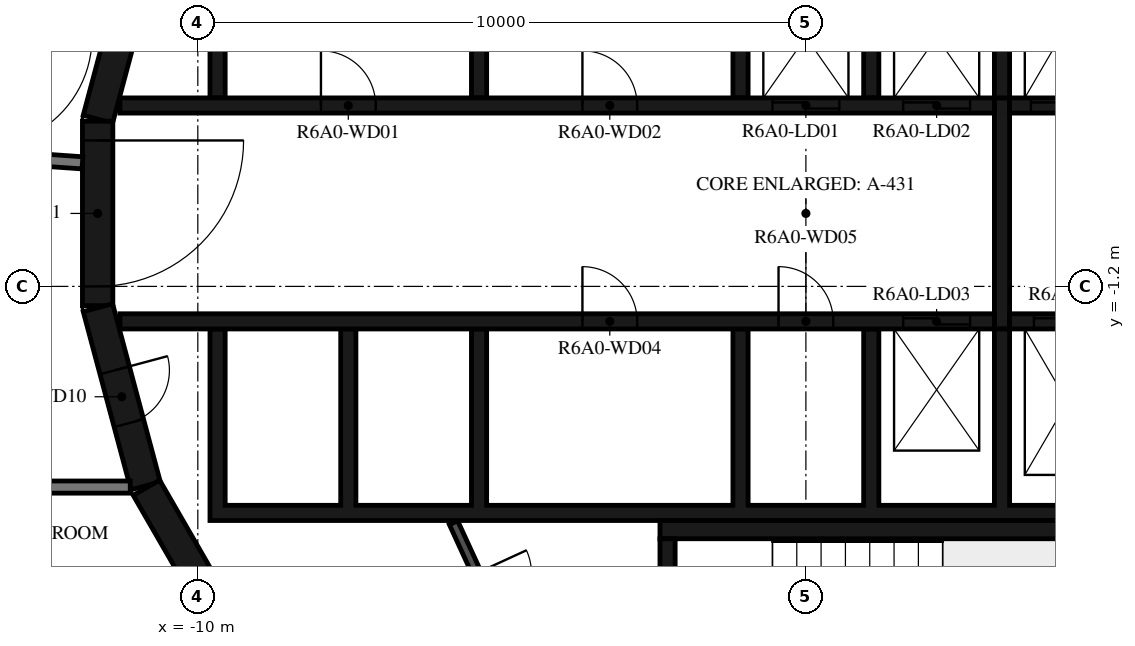
"""IFC4 building model, lengths in metres.
Left out: names, types, materials, properties, quantities, classifications, styles, units other than length and angle.
Written with IfcOpenShell. Run it as: python <this file> out.ifc"""

import sys

from ifc_helpers import new_model, si_unit, direction, frame, frame_2d, origin, place, context, subcontext, project, spatial, polyline, rectangle, outline, extrude, element, fill, save


model = new_model("IFC4")
c1 = context("Model", 3, precision=1e-05, world=origin(), true_north=direction((0.0, 1.0)))
c2 = subcontext(c1, "Body", "Model", "MODEL_VIEW")
j1 = project(units=[si_unit("LENGTHUNIT", "METRE"), si_unit("PLANEANGLEUNIT", "RADIAN")], contexts=[c1])
p1 = place(None, origin())
s1 = spatial("IfcSite", under=j1, at=p1, CompositionType="ELEMENT")
p2 = place(p1, origin())
s2 = spatial("IfcBuilding", under=s1, at=p2, CompositionType="ELEMENT")
p3 = place(p2, frame((0.0, 0.0, 233.7)))
s3 = spatial("IfcBuildingStorey", under=s2, at=p3, CompositionType="ELEMENT", Elevation=233.7)
p4 = place(p3, frame((-10.858, 4.479, 0.0), z_axis=(0.0, 0.0, 1.0), x_axis=(-0.258734743916, -0.965948410781, 0.0)))
e1 = element("IfcWall", 1, at=p4, inside=s3, PredefinedType="SHEAR", context=c2, shape_type="SweptSolid", body=[
    extrude(rectangle(XDim=3.033, YDim=0.5, at=frame_2d((1.516, 0.0))), origin(), (0.0, 0.0, 1.0), 3.12),
])
p5 = place(p3, frame((-11.647, 1.516, 0.0), z_axis=(0.0, 0.0, 1.0), x_axis=(0.0, -1.0, 0.0)))
e2 = element("IfcWall", 2, at=p5, inside=s3, PredefinedType="SHEAR", context=c2, shape_type="SweptSolid", body=[
    extrude(rectangle(XDim=3.033, YDim=0.5, at=frame_2d((1.516, 0.0))), origin(), (0.0, 0.0, 1.0), 3.12),
])
p6 = place(p5, frame((0.316, 0.0, 0.0)))
e3 = element("IfcOpeningElement", 3, at=p6, cuts=e2, PredefinedType="OPENING", context=c2, shape_type="SweptSolid", body=[
    extrude(rectangle(XDim=2.4, YDim=2.1, at=frame_2d((1.2, 1.05))), frame((0.0, 0.26, 0.0), z_axis=(0.0, -1.0, 0.0), x_axis=(1.0, 0.0, 0.0)), (0.0, 0.0, 1.0), 0.52),
])
p7 = place(p3, frame((-11.643, -1.55, 0.0), z_axis=(0.0, 0.0, 1.0), x_axis=(0.258734743916, -0.965948410781, 0.0)))
e4 = element("IfcWall", 4, at=p7, inside=s3, PredefinedType="SHEAR", context=c2, shape_type="SweptSolid", body=[
    extrude(rectangle(XDim=3.033, YDim=0.5, at=frame_2d((1.516, 0.0))), origin(), (0.0, 0.0, 1.0), 3.12),
])
p8 = place(p7, frame((1.066, 0.0, 0.0)))
e5 = element("IfcOpeningElement", 5, at=p8, cuts=e4, PredefinedType="OPENING", context=c2, shape_type="SweptSolid", body=[
    extrude(rectangle(XDim=0.9, YDim=2.1, at=frame_2d((0.45, 1.05))), frame((0.0, 0.26, 0.0), z_axis=(0.0, -1.0, 0.0), x_axis=(1.0, 0.0, 0.0)), (0.0, 0.0, 1.0), 0.52),
])
p9 = place(p3, frame((-10.845, -4.51, 0.0), z_axis=(0.0, 0.0, 1.0), x_axis=(0.500087131594, -0.865975092491, 0.0)))
e6 = element("IfcWall", 6, at=p9, inside=s3, PredefinedType="SHEAR", context=c2, shape_type="SweptSolid", body=[
    extrude(rectangle(XDim=3.033, YDim=0.5, at=frame_2d((1.516, 0.0))), origin(), (0.0, 0.0, 1.0), 3.12),
])
p10 = place(p3, frame((-2.275, -8.67, 0.0), z_axis=(0.0, 0.0, 1.0), x_axis=(0.0, 1.0, 0.0)))
e7 = element("IfcWall", 7, at=p10, inside=s3, PredefinedType="SHEAR", context=c2, shape_type="SweptSolid", body=[
    extrude(rectangle(XDim=3.32, YDim=0.25, at=frame_2d((1.66, 0.0))), origin(), (0.0, 0.0, 1.0), 3.12),
])
p11 = place(p3, frame((-2.4, -5.2, 0.0), z_axis=(0.0, 0.0, 1.0), x_axis=(1.0, 0.0, 0.0)))
e8 = element("IfcWall", 8, at=p11, inside=s3, PredefinedType="SHEAR", context=c2, shape_type="SweptSolid", body=[
    extrude(rectangle(XDim=7.05, YDim=0.3, at=frame_2d((3.525, 0.0))), origin(), (0.0, 0.0, 1.0), 3.12),
])
p12 = place(p3, origin())
e9 = element("IfcWall", 9, at=p12, inside=s3, PredefinedType="SHEAR", context=c2, shape_type="SweptSolid", body=[
    extrude(outline(polyline([(-9.55, 4.8), (-5.5, 4.8), (-5.5, 1.9), (-5.25, 1.9), (-5.25, 4.8), (-1.2, 4.8), (-1.2, 1.9), (-0.95, 1.9), (-0.95, 4.8), (0.95, 4.8), (0.95, 1.9), (1.2, 1.9), (1.2, 4.8), (3.1, 4.8), (3.1, 1.9), (3.35, 1.9), (3.35, 4.8), (5.25, 4.8), (5.25, 1.9), (5.5, 1.9), (5.5, 4.8), (7.4, 4.8), (7.4, 1.9), (7.65, 1.9), (7.65, 4.8), (9.55, 4.8), (9.55, 1.9), (9.8, 1.9), (9.8, 4.8), (9.8, 5.05), (-9.8, 5.05), (-9.8, 4.8), (-9.8, 1.9), (-9.55, 1.9), (-9.55, 4.8)])), origin(), (0.0, 0.0, 1.0), 3.12),
])
p13 = place(p3, origin())
e10 = element("IfcWall", 10, at=p13, inside=s3, PredefinedType="SHEAR", context=c2, shape_type="SweptSolid", body=[
    extrude(outline(polyline([(9.8, -5.05), (9.8, -4.8), (9.8, -1.9), (9.55, -1.9), (9.55, -4.8), (7.65, -4.8), (7.65, -1.9), (7.4, -1.9), (7.4, -4.8), (5.5, -4.8), (5.5, -1.9), (5.25, -1.9), (5.25, -4.8), (3.35, -4.8), (3.35, -1.9), (3.1, -1.9), (3.1, -4.8), (1.2, -4.8), (1.2, -1.9), (0.95, -1.9), (0.95, -4.8), (-0.95, -4.8), (-0.95, -1.9), (-1.2, -1.9), (-1.2, -4.8), (-5.25, -4.8), (-5.25, -1.9), (-5.5, -1.9), (-5.5, -4.8), (-7.4, -4.8), (-7.4, -1.9), (-7.65, -1.9), (-7.65, -4.8), (-9.55, -4.8), (-9.55, -1.9), (-9.8, -1.9), (-9.8, -4.8), (-9.8, -5.05), (9.8, -5.05)])), origin(), (0.0, 0.0, 1.0), 3.12),
])
p14 = place(p3, frame((-11.28, 1.775, 0.0), z_axis=(0.0, 0.0, 1.0), x_axis=(1.0, 0.0, 0.0)))
e11 = element("IfcWall", 11, at=p14, inside=s3, PredefinedType="SHEAR", context=c2, shape_type="SweptSolid", body=[
    extrude(rectangle(XDim=14.38, YDim=0.25, at=frame_2d((7.19, 0.0))), origin(), (0.0, 0.0, 1.0), 3.12),
])
p15 = place(p14, frame((10.73, 0.0, 0.0)))
e12 = element("IfcOpeningElement", 12, at=p15, cuts=e11, PredefinedType="OPENING", context=c2, shape_type="SweptSolid", body=[
    extrude(rectangle(XDim=1.1, YDim=2.1, at=frame_2d((0.55, 1.05))), frame((0.0, 0.135, 0.0), z_axis=(0.0, -1.0, 0.0), x_axis=(1.0, 0.0, 0.0)), (0.0, 0.0, 1.0), 0.27),
])
p16 = place(p14, frame((12.88, 0.0, 0.0)))
e13 = element("IfcOpeningElement", 13, at=p16, cuts=e11, PredefinedType="OPENING", context=c2, shape_type="SweptSolid", body=[
    extrude(rectangle(XDim=1.1, YDim=2.1, at=frame_2d((0.55, 1.05))), frame((0.0, 0.135, 0.0), z_axis=(0.0, -1.0, 0.0), x_axis=(1.0, 0.0, 0.0)), (0.0, 0.0, 1.0), 0.27),
])
p17 = place(p14, frame((3.305, 0.0, 0.0)))
e14 = element("IfcOpeningElement", 14, at=p17, cuts=e11, PredefinedType="OPENING", context=c2, shape_type="SweptSolid", body=[
    extrude(rectangle(XDim=0.9, YDim=2.1, at=frame_2d((0.45, 1.05))), frame((0.0, 0.135, 0.0), z_axis=(0.0, -1.0, 0.0), x_axis=(1.0, 0.0, 0.0)), (0.0, 0.0, 1.0), 0.27),
])
p18 = place(p14, frame((7.605, 0.0, 0.0)))
e15 = element("IfcOpeningElement", 15, at=p18, cuts=e11, PredefinedType="OPENING", context=c2, shape_type="SweptSolid", body=[
    extrude(rectangle(XDim=0.9, YDim=2.1, at=frame_2d((0.45, 1.05))), frame((0.0, 0.135, 0.0), z_axis=(0.0, -1.0, 0.0), x_axis=(1.0, 0.0, 0.0)), (0.0, 0.0, 1.0), 0.27),
])
p19 = place(p3, frame((3.35, 1.775, 0.0), z_axis=(0.0, 0.0, 1.0), x_axis=(1.0, 0.0, 0.0)))
e16 = element("IfcWall", 16, at=p19, inside=s3, PredefinedType="SHEAR", context=c2, shape_type="SweptSolid", body=[
    extrude(rectangle(XDim=7.93, YDim=0.25, at=frame_2d((3.965, 0.0))), origin(), (0.0, 0.0, 1.0), 3.12),
])
p20 = place(p19, frame((0.35, 0.0, 0.0)))
e17 = element("IfcOpeningElement", 17, at=p20, cuts=e16, PredefinedType="OPENING", context=c2, shape_type="SweptSolid", body=[
    extrude(rectangle(XDim=1.2, YDim=2.4, at=frame_2d((0.6, 1.2))), frame((0.0, 0.135, 0.0), z_axis=(0.0, -1.0, 0.0), x_axis=(1.0, 0.0, 0.0)), (0.0, 0.0, 1.0), 0.27),
])
p21 = place(p19, frame((2.5, 0.0, 0.0)))
e18 = element("IfcOpeningElement", 18, at=p21, cuts=e16, PredefinedType="OPENING", context=c2, shape_type="SweptSolid", body=[
    extrude(rectangle(XDim=1.2, YDim=2.4, at=frame_2d((0.6, 1.2))), frame((0.0, 0.135, 0.0), z_axis=(0.0, -1.0, 0.0), x_axis=(1.0, 0.0, 0.0)), (0.0, 0.0, 1.0), 0.27),
])
p22 = place(p19, frame((4.8, 0.0, 0.0)))
e19 = element("IfcOpeningElement", 19, at=p22, cuts=e16, PredefinedType="OPENING", context=c2, shape_type="SweptSolid", body=[
    extrude(rectangle(XDim=0.9, YDim=2.1, at=frame_2d((0.45, 1.05))), frame((0.0, 0.135, 0.0), z_axis=(0.0, -1.0, 0.0), x_axis=(1.0, 0.0, 0.0)), (0.0, 0.0, 1.0), 0.27),
])
p23 = place(p3, frame((-11.28, -1.775, 0.0), z_axis=(0.0, 0.0, 1.0), x_axis=(1.0, 0.0, 0.0)))
e20 = element("IfcWall", 20, at=p23, inside=s3, PredefinedType="SHEAR", context=c2, shape_type="SweptSolid", body=[
    extrude(rectangle(XDim=14.38, YDim=0.25, at=frame_2d((7.19, 0.0))), origin(), (0.0, 0.0, 1.0), 3.12),
])
p24 = place(p23, frame((12.88, 0.0, 0.0)))
e21 = element("IfcOpeningElement", 21, at=p24, cuts=e20, PredefinedType="OPENING", context=c2, shape_type="SweptSolid", body=[
    extrude(rectangle(XDim=1.1, YDim=2.1, at=frame_2d((0.55, 1.05))), frame((0.0, 0.135, 0.0), z_axis=(0.0, -1.0, 0.0), x_axis=(1.0, 0.0, 0.0)), (0.0, 0.0, 1.0), 0.27),
])
p25 = place(p23, frame((7.605, 0.0, 0.0)))
e22 = element("IfcOpeningElement", 22, at=p25, cuts=e20, PredefinedType="OPENING", context=c2, shape_type="SweptSolid", body=[
    extrude(rectangle(XDim=0.9, YDim=2.1, at=frame_2d((0.45, 1.05))), frame((0.0, 0.135, 0.0), z_axis=(0.0, -1.0, 0.0), x_axis=(1.0, 0.0, 0.0)), (0.0, 0.0, 1.0), 0.27),
])
p26 = place(p23, frame((10.83, 0.0, 0.0)))
e23 = element("IfcOpeningElement", 23, at=p26, cuts=e20, PredefinedType="OPENING", context=c2, shape_type="SweptSolid", body=[
    extrude(rectangle(XDim=0.9, YDim=2.1, at=frame_2d((0.45, 1.05))), frame((0.0, 0.135, 0.0), z_axis=(0.0, -1.0, 0.0), x_axis=(1.0, 0.0, 0.0)), (0.0, 0.0, 1.0), 0.27),
])
p27 = place(p3, frame((3.35, -1.775, 0.0), z_axis=(0.0, 0.0, 1.0), x_axis=(1.0, 0.0, 0.0)))
e24 = element("IfcWall", 24, at=p27, inside=s3, PredefinedType="SHEAR", context=c2, shape_type="SweptSolid", body=[
    extrude(rectangle(XDim=7.93, YDim=0.25, at=frame_2d((3.965, 0.0))), origin(), (0.0, 0.0, 1.0), 3.12),
])
p28 = place(p27, frame((0.4, 0.0, 0.0)))
e25 = element("IfcOpeningElement", 25, at=p28, cuts=e24, PredefinedType="OPENING", context=c2, shape_type="SweptSolid", body=[
    extrude(rectangle(XDim=1.1, YDim=2.4, at=frame_2d((0.55, 1.2))), frame((0.0, 0.135, 0.0), z_axis=(0.0, -1.0, 0.0), x_axis=(1.0, 0.0, 0.0)), (0.0, 0.0, 1.0), 0.27),
])
p29 = place(p27, frame((2.55, 0.0, 0.0)))
e26 = element("IfcOpeningElement", 26, at=p29, cuts=e24, PredefinedType="OPENING", context=c2, shape_type="SweptSolid", body=[
    extrude(rectangle(XDim=1.1, YDim=2.4, at=frame_2d((0.55, 1.2))), frame((0.0, 0.135, 0.0), z_axis=(0.0, -1.0, 0.0), x_axis=(1.0, 0.0, 0.0)), (0.0, 0.0, 1.0), 0.27),
])
p30 = place(p27, frame((4.7, 0.0, 0.0)))
e27 = element("IfcOpeningElement", 27, at=p30, cuts=e24, PredefinedType="OPENING", context=c2, shape_type="SweptSolid", body=[
    extrude(rectangle(XDim=1.1, YDim=2.4, at=frame_2d((0.55, 1.2))), frame((0.0, 0.135, 0.0), z_axis=(0.0, -1.0, 0.0), x_axis=(1.0, 0.0, 0.0)), (0.0, 0.0, 1.0), 0.27),
])
p31 = place(p3, frame((3.225, -1.9, 0.0), z_axis=(0.0, 0.0, 1.0), x_axis=(0.0, 1.0, 0.0)))
e28 = element("IfcWall", 28, at=p31, inside=s3, PredefinedType="SHEAR", context=c2, shape_type="SweptSolid", body=[
    extrude(rectangle(XDim=3.8, YDim=0.25, at=frame_2d((1.9, 0.0))), origin(), (0.0, 0.0, 1.0), 3.12),
])
p32 = place(p3, frame((-5.795, -5.086, 0.0), z_axis=(0.0, 0.0, 1.0), x_axis=(0.417887867606, -0.908498613157, 0.0)))
e29 = element("IfcWall", 29, at=p32, inside=s3, PredefinedType="PARTITIONING", context=c2, shape_type="SweptSolid", body=[
    extrude(rectangle(XDim=2.726, YDim=0.15, at=frame_2d((1.363, 0.0))), origin(), (0.0, 0.0, 1.0), 3.12),
])
p33 = place(p32, frame((0.913, 0.0, 0.0)))
e30 = element("IfcOpeningElement", 30, at=p33, cuts=e29, PredefinedType="OPENING", context=c2, shape_type="SweptSolid", body=[
    extrude(rectangle(XDim=0.9, YDim=2.1, at=frame_2d((0.45, 1.05))), frame((0.0, 0.085, 0.0), z_axis=(0.0, -1.0, 0.0), x_axis=(1.0, 0.0, 0.0)), (0.0, 0.0, 1.0), 0.17),
])
p34 = place(p3, frame((-13.454, 0.941, 0.0), z_axis=(0.0, 0.0, 1.0), x_axis=(0.99755155062, -0.069934997354, 0.0)))
e31 = element("IfcWall", 31, at=p34, inside=s3, PredefinedType="STANDARD", context=c2, shape_type="SweptSolid", body=[
    extrude(rectangle(XDim=1.561, YDim=0.2, at=frame_2d((0.78, 0.0))), origin(), (0.0, 0.0, 1.0), 3.12),
])
p35 = place(p3, frame((-17.655, -4.5, 0.0), z_axis=(0.0, 0.0, 1.0), x_axis=(1.0, 0.0, 0.0)))
e32 = element("IfcWall", 32, at=p35, inside=s3, PredefinedType="STANDARD", context=c2, shape_type="SweptSolid", body=[
    extrude(rectangle(XDim=6.543, YDim=0.2, at=frame_2d((3.272, 0.0))), origin(), (0.0, 0.0, 1.0), 3.12),
])
p36 = place(p6, origin())
e33 = element("IfcDoor", 33, at=p36, inside=s3, OperationType="DOUBLE_DOOR_SINGLE_SWING", PredefinedType="DOOR", context=c2, shape_type="SweptSolid", body=[
    extrude(rectangle(XDim=2.4, YDim=2.1, at=frame_2d((1.2, 1.05))), frame((0.0, 0.025, 0.0), z_axis=(0.0, -1.0, 0.0), x_axis=(1.0, 0.0, 0.0)), (0.0, 0.0, 1.0), 0.05),
])
fill(e3, e33)
p37 = place(p15, origin())
e34 = element("IfcDoor", 34, at=p37, inside=s3, OperationType="DOUBLE_DOOR_SLIDING", PredefinedType="DOOR", context=c2, shape_type="SweptSolid", body=[
    extrude(rectangle(XDim=1.1, YDim=2.1, at=frame_2d((0.55, 1.05))), frame((0.0, 0.025, 0.0), z_axis=(0.0, -1.0, 0.0), x_axis=(1.0, 0.0, 0.0)), (0.0, 0.0, 1.0), 0.05),
])
fill(e12, e34)
p38 = place(p16, origin())
e35 = element("IfcDoor", 35, at=p38, inside=s3, OperationType="DOUBLE_DOOR_SLIDING", PredefinedType="DOOR", context=c2, shape_type="SweptSolid", body=[
    extrude(rectangle(XDim=1.1, YDim=2.1, at=frame_2d((0.55, 1.05))), frame((0.0, 0.025, 0.0), z_axis=(0.0, -1.0, 0.0), x_axis=(1.0, 0.0, 0.0)), (0.0, 0.0, 1.0), 0.05),
])
fill(e13, e35)
p39 = place(p20, origin())
e36 = element("IfcDoor", 36, at=p39, inside=s3, OperationType="DOUBLE_DOOR_SLIDING", PredefinedType="DOOR", context=c2, shape_type="SweptSolid", body=[
    extrude(rectangle(XDim=1.2, YDim=2.4, at=frame_2d((0.6, 1.2))), frame((0.0, 0.025, 0.0), z_axis=(0.0, -1.0, 0.0), x_axis=(1.0, 0.0, 0.0)), (0.0, 0.0, 1.0), 0.05),
])
fill(e17, e36)
p40 = place(p24, origin())
e37 = element("IfcDoor", 37, at=p40, inside=s3, OperationType="DOUBLE_DOOR_SLIDING", PredefinedType="DOOR", context=c2, shape_type="SweptSolid", body=[
    extrude(rectangle(XDim=1.1, YDim=2.1, at=frame_2d((0.55, 1.05))), frame((0.0, 0.025, 0.0), z_axis=(0.0, -1.0, 0.0), x_axis=(1.0, 0.0, 0.0)), (0.0, 0.0, 1.0), 0.05),
])
fill(e21, e37)
p41 = place(p28, origin())
e38 = element("IfcDoor", 38, at=p41, inside=s3, OperationType="DOUBLE_DOOR_SLIDING", PredefinedType="DOOR", context=c2, shape_type="SweptSolid", body=[
    extrude(rectangle(XDim=1.1, YDim=2.4, at=frame_2d((0.55, 1.2))), frame((0.0, 0.025, 0.0), z_axis=(0.0, -1.0, 0.0), x_axis=(1.0, 0.0, 0.0)), (0.0, 0.0, 1.0), 0.05),
])
fill(e25, e38)
p42 = place(p17, origin())
e39 = element("IfcDoor", 39, at=p42, inside=s3, OperationType="SINGLE_SWING_LEFT", PredefinedType="DOOR", context=c2, shape_type="SweptSolid", body=[
    extrude(rectangle(XDim=0.9, YDim=2.1, at=frame_2d((0.45, 1.05))), frame((0.0, 0.025, 0.0), z_axis=(0.0, -1.0, 0.0), x_axis=(1.0, 0.0, 0.0)), (0.0, 0.0, 1.0), 0.05),
])
fill(e14, e39)
p43 = place(p18, origin())
e40 = element("IfcDoor", 40, at=p43, inside=s3, OperationType="SINGLE_SWING_RIGHT", PredefinedType="DOOR", context=c2, shape_type="SweptSolid", body=[
    extrude(rectangle(XDim=0.9, YDim=2.1, at=frame_2d((0.45, 1.05))), frame((0.0, 0.025, 0.0), z_axis=(0.0, -1.0, 0.0), x_axis=(1.0, 0.0, 0.0)), (0.0, 0.0, 1.0), 0.05),
])
fill(e15, e40)
p44 = place(p25, origin())
e41 = element("IfcDoor", 41, at=p44, inside=s3, OperationType="SINGLE_SWING_RIGHT", PredefinedType="DOOR", context=c2, shape_type="SweptSolid", body=[
    extrude(rectangle(XDim=0.9, YDim=2.1, at=frame_2d((0.45, 1.05))), frame((0.0, 0.025, 0.0), z_axis=(0.0, -1.0, 0.0), x_axis=(1.0, 0.0, 0.0)), (0.0, 0.0, 1.0), 0.05),
])
fill(e22, e41)
p45 = place(p26, origin())
e42 = element("IfcDoor", 42, at=p45, inside=s3, OperationType="SINGLE_SWING_LEFT", PredefinedType="DOOR", context=c2, shape_type="SweptSolid", body=[
    extrude(rectangle(XDim=0.9, YDim=2.1, at=frame_2d((0.45, 1.05))), frame((0.0, 0.025, 0.0), z_axis=(0.0, -1.0, 0.0), x_axis=(1.0, 0.0, 0.0)), (0.0, 0.0, 1.0), 0.05),
])
fill(e23, e42)
p46 = place(p8, origin())
e43 = element("IfcDoor", 43, at=p46, inside=s3, OperationType="SINGLE_SWING_RIGHT", PredefinedType="DOOR", context=c2, shape_type="SweptSolid", body=[
    extrude(rectangle(XDim=0.9, YDim=2.1, at=frame_2d((0.45, 1.05))), frame((0.0, 0.025, 0.0), z_axis=(0.0, -1.0, 0.0), x_axis=(1.0, 0.0, 0.0)), (0.0, 0.0, 1.0), 0.05),
])
fill(e5, e43)
save(model, sys.argv[1])
